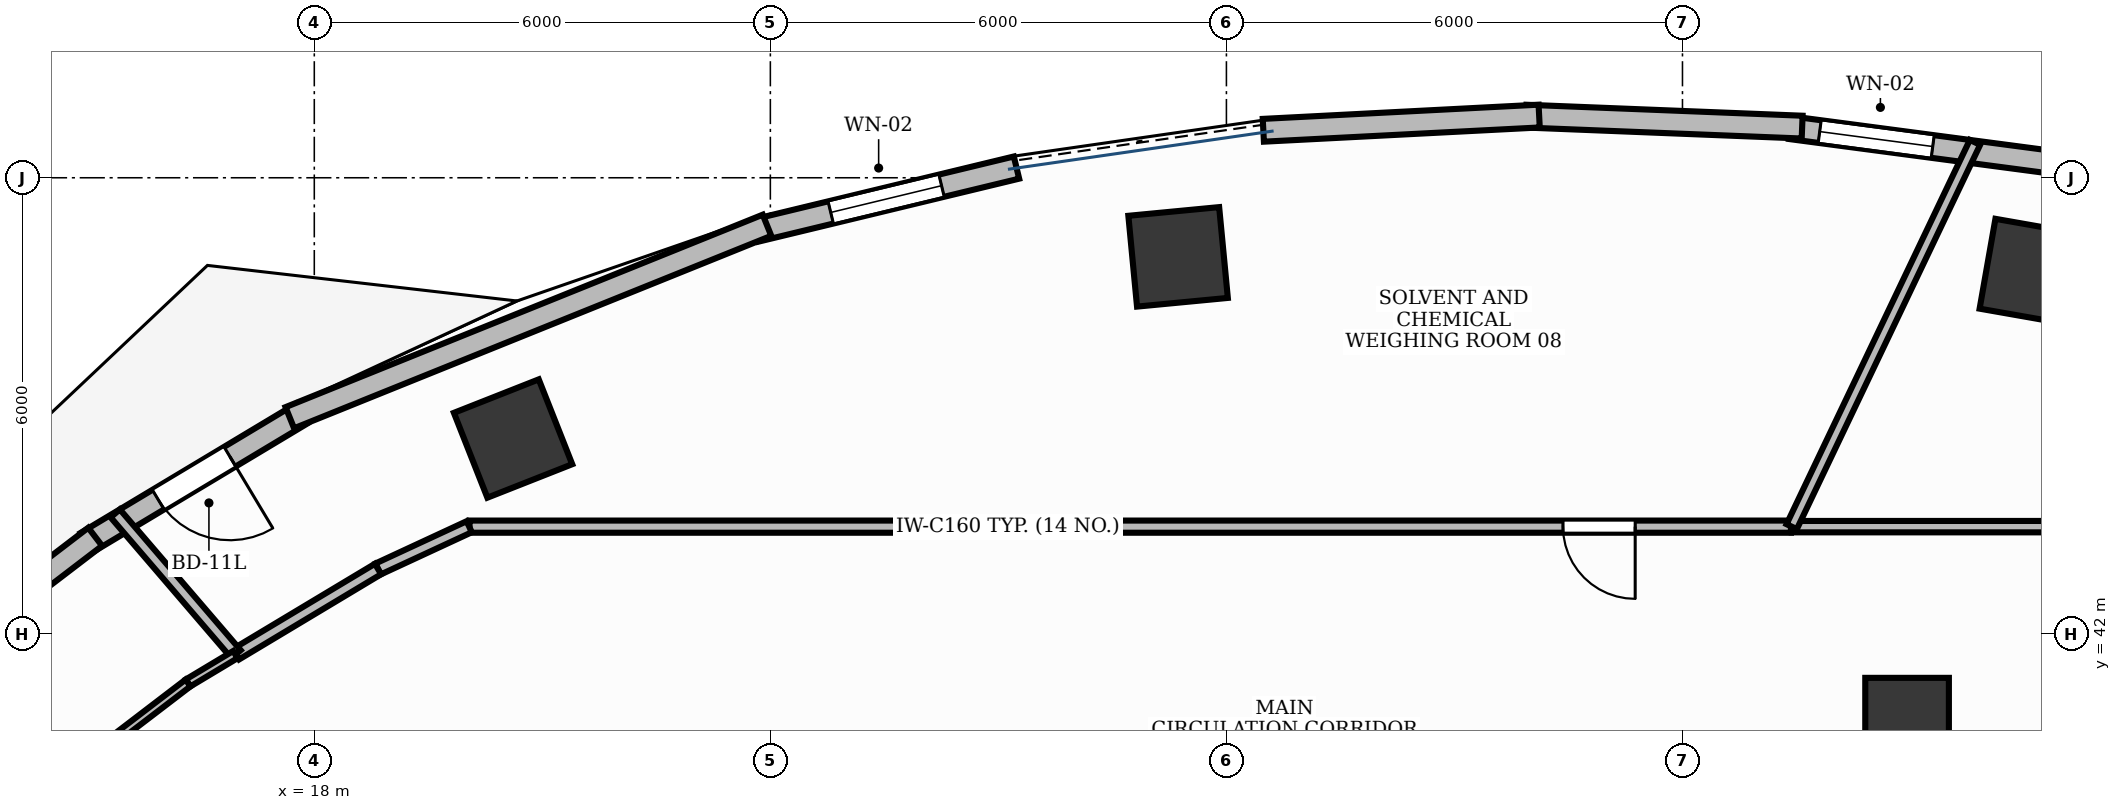
"""IFC4 building model, lengths in metres.
Left out: names, types, materials, properties, quantities, classifications, styles, units other than length and angle.
Written with IfcOpenShell. Run it as: python <this file> out.ifc"""

import sys

from ifc_helpers import new_model, si_unit, direction, frame, frame_2d, origin, origin_2d, place, context, subcontext, project, spatial, rectangle, extrude, element, fill, save


model = new_model("IFC4")
c1 = context("Model", 3, precision=1e-05, world=origin(), true_north=direction((0.0, 1.0)))
c2 = subcontext(c1, "Body", "Model", "MODEL_VIEW")
j1 = project(units=[si_unit("LENGTHUNIT", "METRE"), si_unit("PLANEANGLEUNIT", "RADIAN")], contexts=[c1])
p1 = place(None, origin())
s1 = spatial("IfcSite", under=j1, at=p1, CompositionType="ELEMENT")
p2 = place(p1, origin())
s2 = spatial("IfcBuilding", under=s1, at=p2, CompositionType="ELEMENT")
p3 = place(p2, frame((0.0, 0.0, 106.8)))
s3 = spatial("IfcBuildingStorey", under=s2, at=p3, CompositionType="ELEMENT", Elevation=106.8)
p4 = place(p3, frame((40.604, 46.765, -0.0), z_axis=(0.0, 0.0, 1.0), x_axis=(-0.984868307662, 0.173304404339, 0.0)))
e1 = element("IfcColumn", 1, at=p4, inside=s3, PredefinedType="COLUMN", context=c2, shape_type="SweptSolid", body=[
    extrude(rectangle(XDim=1.2, YDim=1.2, at=origin_2d()), origin(), (0.0, 0.0, 1.0), 3.901),
])
p5 = place(p3, frame((38.955, 40.871, -0.0), z_axis=(0.0, 0.0, 1.0), x_axis=(1.0, 0.0, 0.0)))
e2 = element("IfcColumn", 2, at=p5, inside=s3, PredefinedType="COLUMN", context=c2, shape_type="SweptSolid", body=[
    extrude(rectangle(XDim=1.1, YDim=1.1, at=origin_2d()), origin(), (0.0, 0.0, 1.0), 3.901),
])
for number, where, z_axis, x_axis in (
    (3, (29.364, 46.959, -0.0), (0.0, 0.0, 1.0), (0.995, 0.095, 0.0)),
    (4, (20.615, 44.569, -0.0), (0.0, 0.0, 1.0), (0.93, 0.367, 0.0)),
    (5, (13.758, 40.4, -0.0), (0.0, 0.0, 1.0), (0.764, 0.645, 0.0)),
):
    element("IfcColumn", number, at=place(p3, frame(where, z_axis=z_axis, x_axis=x_axis)), inside=s3, PredefinedType="COLUMN", context=c2, shape_type="SweptSolid", body=[
        extrude(rectangle(XDim=1.2, YDim=1.2, at=origin_2d()), origin(), (0.0, 0.0, 1.0), 3.901),
    ])
p6 = place(p3, frame((40.964, 48.19, 0.0), z_axis=(0.0, 0.0, 1.0), x_axis=(-0.991369257822, 0.131099178664, 0.0)))
e6 = element("IfcWall", 6, at=p6, inside=s3, PredefinedType="STANDARD", context=c2, shape_type="SweptSolid", body=[
    extrude(rectangle(XDim=3.575, YDim=0.3, at=frame_2d((1.788, 0.0))), origin(), (0.0, 0.0, 1.0), 3.47),
])
p7 = place(p6, frame((1.686, 0.0, 0.95)))
e7 = element("IfcOpeningElement", 7, at=p7, cuts=e6, PredefinedType="OPENING", context=c2, shape_type="SweptSolid", body=[
    extrude(rectangle(XDim=1.5, YDim=1.8, at=frame_2d((0.75, 0.9))), frame((0.0, 0.165, 0.0), z_axis=(0.0, -1.0, 0.0), x_axis=(1.0, 0.0, 0.0)), (0.0, 0.0, 1.0), 0.33),
])
p8 = place(p3, frame((27.238, 48.134, 0.0), z_axis=(0.0, 0.0, 1.0), x_axis=(-0.972049000874, -0.234778065203, 0.0)))
e8 = element("IfcWall", 8, at=p8, inside=s3, PredefinedType="STANDARD", context=c2, shape_type="SweptSolid", body=[
    extrude(rectangle(XDim=3.528, YDim=0.3, at=frame_2d((1.764, 0.0))), origin(), (0.0, 0.0, 1.0), 3.9),
])
p9 = place(p8, frame((1.014, 0.0, 0.95)))
e9 = element("IfcOpeningElement", 9, at=p9, cuts=e8, PredefinedType="OPENING", context=c2, shape_type="SweptSolid", body=[
    extrude(rectangle(XDim=1.5, YDim=1.8, at=frame_2d((0.75, 0.9))), frame((0.0, 0.165, 0.0), z_axis=(0.0, -1.0, 0.0), x_axis=(1.0, 0.0, 0.0)), (0.0, 0.0, 1.0), 0.33),
])
p10 = place(p3, frame((17.833, 44.897, 0.0), z_axis=(0.0, 0.0, 1.0), x_axis=(-0.85758429223, -0.514343447242, 0.0)))
e10 = element("IfcWall", 10, at=p10, inside=s3, PredefinedType="STANDARD", context=c2, shape_type="SweptSolid", body=[
    extrude(rectangle(XDim=3.3, YDim=0.3, at=frame_2d((1.65, 0.0))), origin(), (0.0, 0.0, 1.0), 3.9),
])
p11 = place(p10, frame((1.1, 0.0, 0.0)))
e11 = element("IfcOpeningElement", 11, at=p11, cuts=e10, PredefinedType="OPENING", context=c2, shape_type="SweptSolid", body=[
    extrude(rectangle(XDim=1.1, YDim=2.15, at=frame_2d((0.55, 1.075))), frame((0.0, 0.165, 0.0), z_axis=(0.0, -1.0, 0.0), x_axis=(1.0, 0.0, 0.0)), (0.0, 0.0, 1.0), 0.33),
])
p12 = place(p3, frame((15.117, 43.277, 0.0), z_axis=(0.0, 0.0, 1.0), x_axis=(-0.794524406211, -0.607232219119, 0.0)))
e12 = element("IfcWall", 12, at=p12, inside=s3, PredefinedType="STANDARD", context=c2, shape_type="SweptSolid", body=[
    extrude(rectangle(XDim=3.203, YDim=0.3, at=frame_2d((1.602, 0.0))), origin(), (0.0, 0.0, 1.0), 3.9),
])
p13 = place(p12, frame((0.851, 0.0, 0.95)))
e13 = element("IfcOpeningElement", 13, at=p13, cuts=e12, PredefinedType="OPENING", context=c2, shape_type="SweptSolid", body=[
    extrude(rectangle(XDim=1.5, YDim=1.8, at=frame_2d((0.75, 0.9))), frame((0.0, 0.165, 0.0), z_axis=(0.0, -1.0, 0.0), x_axis=(1.0, 0.0, 0.0)), (0.0, 0.0, 1.0), 0.33),
])
p14 = place(p3, frame((37.574, 48.666, 0.0), z_axis=(0.0, 0.0, 1.0), x_axis=(-0.999212076676, 0.039689114679, 0.0)))
e14 = element("IfcWall", 14, at=p14, inside=s3, PredefinedType="STANDARD", context=c2, shape_type="SweptSolid", body=[
    extrude(rectangle(XDim=3.635, YDim=0.3, at=frame_2d((1.818, 0.0))), origin(), (0.0, 0.0, 1.0), 3.9),
])
p15 = place(p3, frame((34.115, 48.812, 0.0), z_axis=(0.0, 0.0, 1.0), x_axis=(-0.998674767218, -0.051465613004, 0.0)))
e15 = element("IfcWall", 15, at=p15, inside=s3, PredefinedType="STANDARD", context=c2, shape_type="SweptSolid", body=[
    extrude(rectangle(XDim=3.634, YDim=0.3, at=frame_2d((1.817, 0.0))), origin(), (0.0, 0.0, 1.0), 3.47),
])
p16 = place(p3, frame((23.956, 47.375, 0.0), z_axis=(0.0, 0.0, 1.0), x_axis=(-0.927423312416, -0.374013368194, 0.0)))
e16 = element("IfcWall", 16, at=p16, inside=s3, PredefinedType="STANDARD", context=c2, shape_type="SweptSolid", body=[
    extrude(rectangle(XDim=6.769, YDim=0.3, at=frame_2d((3.385, 0.0))), origin(), (0.0, 0.0, 1.0), 3.9),
])
p17 = place(p3, frame((44.2, 43.41, 0.0), z_axis=(0.0, 0.0, 1.0), x_axis=(-1.0, 0.0, 0.0)))
e17 = element("IfcWall", 17, at=p17, inside=s3, PredefinedType="PARTITIONING", context=c2, shape_type="SweptSolid", body=[
    extrude(rectangle(XDim=6.763, YDim=0.15, at=frame_2d((3.381, 0.0))), origin(), (0.0, 0.0, 1.0), 2.91),
])
p18 = place(p17, frame((0.24, 0.0, 0.0)))
e18 = element("IfcOpeningElement", 18, at=p18, cuts=e17, PredefinedType="OPENING", context=c2, shape_type="SweptSolid", body=[
    extrude(rectangle(XDim=0.95, YDim=2.15, at=frame_2d((0.475, 1.075))), frame((0.0, 0.09, 0.0), z_axis=(0.0, -1.0, 0.0), x_axis=(1.0, 0.0, 0.0)), (0.0, 0.0, 1.0), 0.18),
])
p19 = place(p3, frame((37.427, 43.41, 0.0), z_axis=(0.0, 0.0, 1.0), x_axis=(-1.0, 0.0, 0.0)))
e19 = element("IfcWall", 19, at=p19, inside=s3, PredefinedType="PARTITIONING", context=c2, shape_type="SweptSolid", body=[
    extrude(rectangle(XDim=17.385, YDim=0.16, at=frame_2d((8.692, 0.0))), origin(), (0.0, 0.0, 1.0), 2.91),
])
p20 = place(p19, frame((2.049, 0.0, 0.0)))
e20 = element("IfcOpeningElement", 20, at=p20, cuts=e19, PredefinedType="OPENING", context=c2, shape_type="SweptSolid", body=[
    extrude(rectangle(XDim=0.95, YDim=2.15, at=frame_2d((0.475, 1.075))), frame((0.0, 0.095, 0.0), z_axis=(0.0, -1.0, 0.0), x_axis=(1.0, 0.0, 0.0)), (0.0, 0.0, 1.0), 0.19),
])
p21 = place(p3, frame((37.437, 43.41, 0.0), z_axis=(0.0, 0.0, 1.0), x_axis=(0.430520600722, 0.902580751154, 0.0)))
e21 = element("IfcWall", 21, at=p21, inside=s3, PredefinedType="PARTITIONING", context=c2, shape_type="SweptSolid", body=[
    extrude(rectangle(XDim=5.601, YDim=0.15, at=frame_2d((2.801, 0.0))), origin(), (0.0, 0.0, 1.0), 2.91),
])
p22 = place(p3, frame((20.038, 43.409, 0.0), z_axis=(0.0, 0.0, 1.0), x_axis=(-0.907124862852, -0.420861596248, 0.0)))
e22 = element("IfcWall", 22, at=p22, inside=s3, PredefinedType="PARTITIONING", context=c2, shape_type="SweptSolid", body=[
    extrude(rectangle(XDim=1.322, YDim=0.16, at=frame_2d((0.661, 0.0))), origin(), (0.0, 0.0, 1.0), 2.91),
])
p23 = place(p3, frame((18.839, 42.853, 0.0), z_axis=(0.0, 0.0, 1.0), x_axis=(-0.857651118507, -0.514232008848, 0.0)))
e23 = element("IfcWall", 23, at=p23, inside=s3, PredefinedType="PARTITIONING", context=c2, shape_type="SweptSolid", body=[
    extrude(rectangle(XDim=2.178, YDim=0.16, at=frame_2d((1.089, 0.0))), origin(), (0.0, 0.0, 1.0), 2.91),
])
p24 = place(p3, frame((16.97, 41.732, 0.0), z_axis=(0.0, 0.0, 1.0), x_axis=(-0.651186692683, 0.758917578708, 0.0)))
e24 = element("IfcWall", 24, at=p24, inside=s3, PredefinedType="PARTITIONING", context=c2, shape_type="SweptSolid", body=[
    extrude(rectangle(XDim=2.441, YDim=0.16, at=frame_2d((1.22, 0.0))), origin(), (0.0, 0.0, 1.0), 2.91),
])
p25 = place(p3, frame((16.962, 41.727, 0.0), z_axis=(0.0, 0.0, 1.0), x_axis=(-0.857611696608, -0.514297752126, 0.0)))
e25 = element("IfcWall", 25, at=p25, inside=s3, PredefinedType="MOVABLE", context=c2, shape_type="SweptSolid", body=[
    extrude(rectangle(XDim=0.725, YDim=0.11, at=frame_2d((0.363, 0.0))), origin(), (0.0, 0.0, 1.0), 2.91),
])
p26 = place(p3, frame((16.339, 41.354, 0.0), z_axis=(0.0, 0.0, 1.0), x_axis=(-0.794513779695, -0.607246122981, 0.0)))
e26 = element("IfcWall", 26, at=p26, inside=s3, PredefinedType="MOVABLE", context=c2, shape_type="SweptSolid", body=[
    extrude(rectangle(XDim=2.799, YDim=0.11, at=frame_2d((1.399, 0.0))), origin(), (0.0, 0.0, 1.0), 2.91),
])
p27 = place(p7, origin())
e27 = element("IfcWindow", 27, at=p27, inside=s3, PartitioningType="DOUBLE_PANEL_VERTICAL", PredefinedType="WINDOW", context=c2, shape_type="SweptSolid", body=[
    extrude(rectangle(XDim=1.5, YDim=1.8, at=frame_2d((0.75, 0.9))), frame((0.0, 0.03, 0.0), z_axis=(0.0, -1.0, 0.0), x_axis=(1.0, 0.0, 0.0)), (0.0, 0.0, 1.0), 0.06),
])
fill(e7, e27)
p28 = place(p9, origin())
e28 = element("IfcWindow", 28, at=p28, inside=s3, PartitioningType="DOUBLE_PANEL_VERTICAL", PredefinedType="WINDOW", context=c2, shape_type="SweptSolid", body=[
    extrude(rectangle(XDim=1.5, YDim=1.8, at=frame_2d((0.75, 0.9))), frame((0.0, 0.03, 0.0), z_axis=(0.0, -1.0, 0.0), x_axis=(1.0, 0.0, 0.0)), (0.0, 0.0, 1.0), 0.06),
])
fill(e9, e28)
p29 = place(p11, origin())
e29 = element("IfcDoor", 29, at=p29, inside=s3, OperationType="SINGLE_SWING_LEFT", PredefinedType="DOOR", context=c2, shape_type="SweptSolid", body=[
    extrude(rectangle(XDim=1.1, YDim=2.15, at=frame_2d((0.55, 1.075))), frame((0.0, 0.025, 0.0), z_axis=(0.0, -1.0, 0.0), x_axis=(1.0, 0.0, 0.0)), (0.0, 0.0, 1.0), 0.05),
])
fill(e11, e29)
p30 = place(p20, origin())
e30 = element("IfcDoor", 30, at=p30, inside=s3, OperationType="SINGLE_SWING_LEFT", PredefinedType="DOOR", context=c2, shape_type="SweptSolid", body=[
    extrude(rectangle(XDim=0.95, YDim=2.15, at=frame_2d((0.475, 1.075))), frame((0.0, 0.025, 0.0), z_axis=(0.0, -1.0, 0.0), x_axis=(1.0, 0.0, 0.0)), (0.0, 0.0, 1.0), 0.05),
])
fill(e20, e30)
save(model, sys.argv[1])
